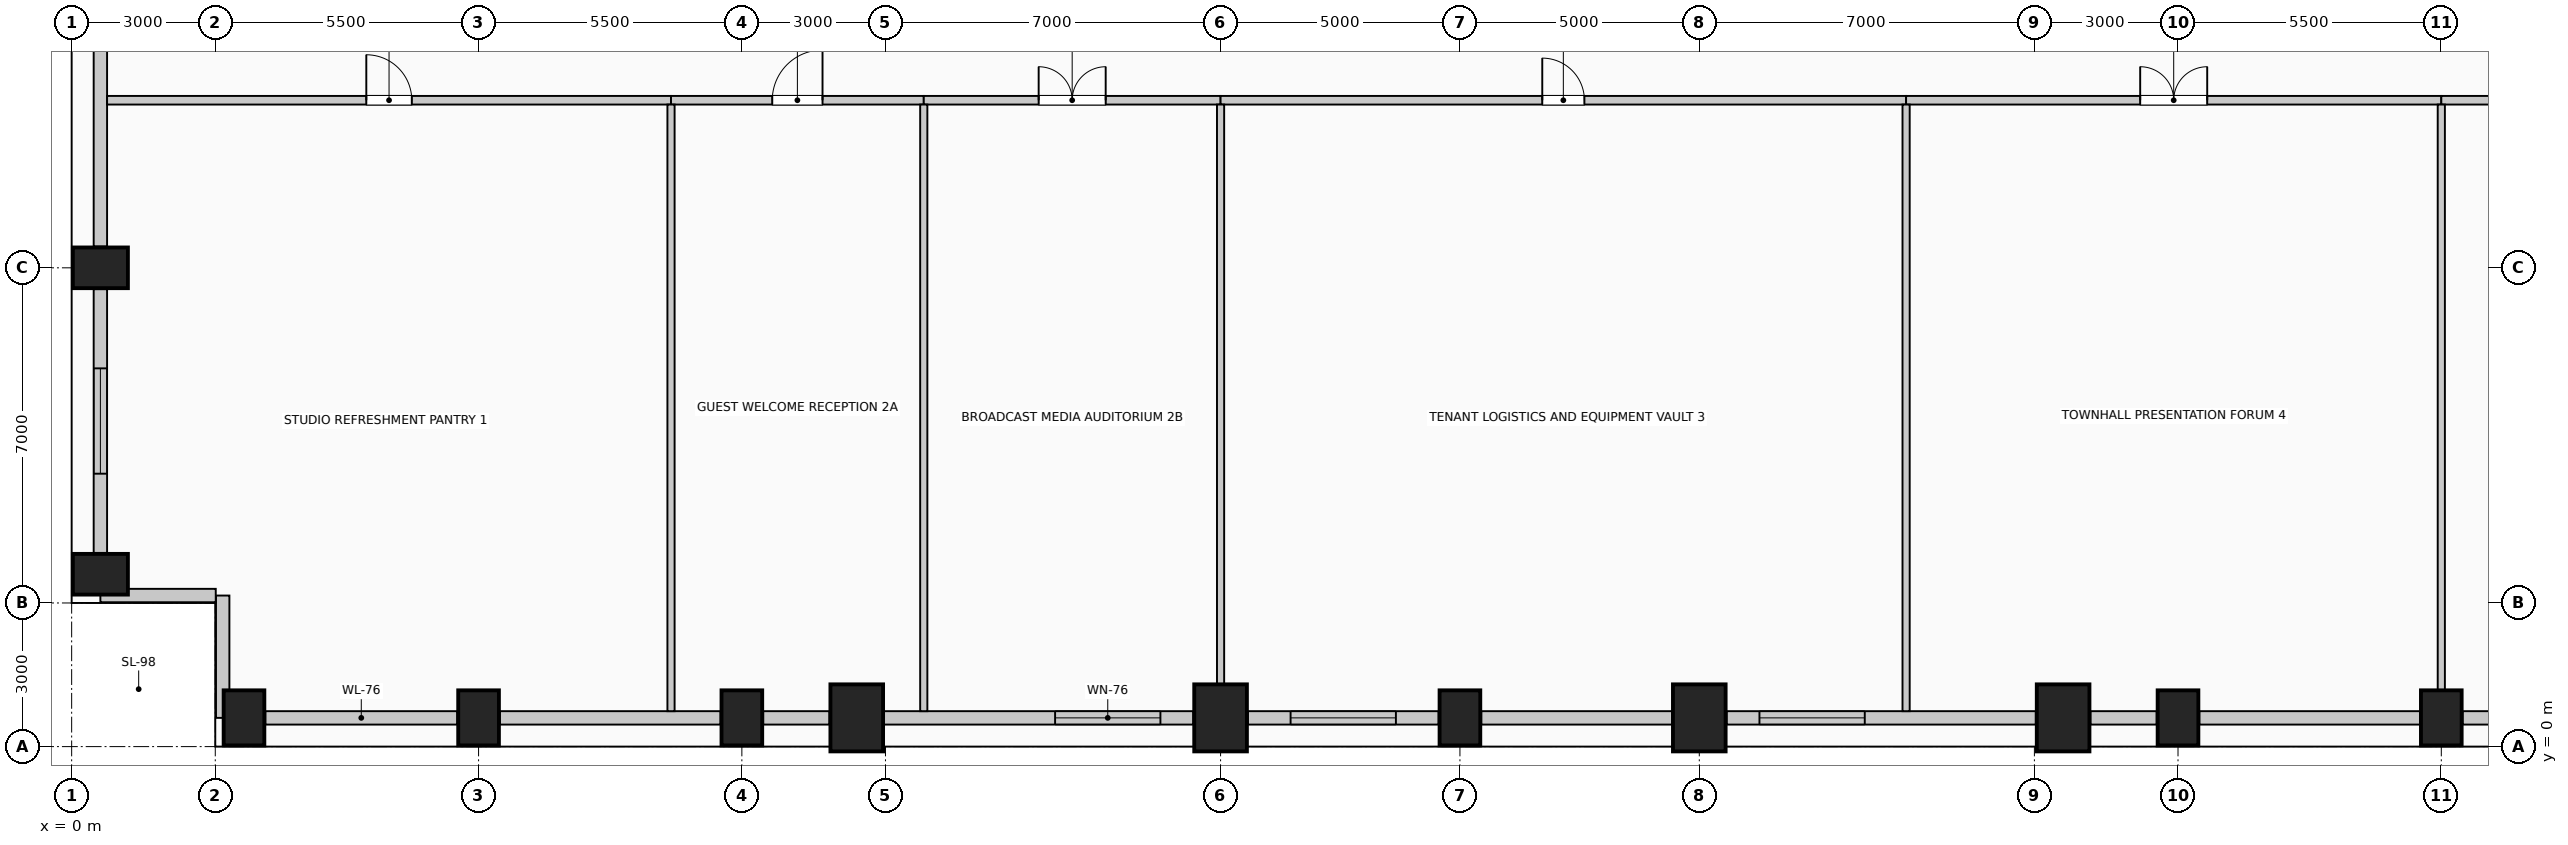
"""IFC4 building model, lengths in metres.
Left out: names, types, materials, properties, quantities, classifications, styles, units other than length and angle.
Written with IfcOpenShell. Run it as: python <this file> out.ifc"""

import sys

from ifc_helpers import new_model, si_unit, direction, frame, frame_2d, origin, origin_2d, place, context, subcontext, project, spatial, rectangle, extrude, element, fill, save


model = new_model("IFC4")
c1 = context("Model", 3, precision=1e-05, world=origin(), true_north=direction((0.0, 1.0)))
c2 = subcontext(c1, "Body", "Model", "MODEL_VIEW")
j1 = project(units=[si_unit("LENGTHUNIT", "METRE"), si_unit("PLANEANGLEUNIT", "RADIAN")], contexts=[c1])
p1 = place(None, origin())
s1 = spatial("IfcSite", under=j1, at=p1, CompositionType="ELEMENT")
p2 = place(p1, origin())
s2 = spatial("IfcBuilding", under=s1, at=p2, CompositionType="ELEMENT")
p3 = place(p2, frame((0.0, 0.0, 92.6)))
s3 = spatial("IfcBuildingStorey", under=s2, at=p3, CompositionType="ELEMENT", Elevation=92.6)
for number, where, z_axis, x_axis in (
    (1, (3.6, 0.6, 0.0), (0.0, 0.0, 1.0), (1.0, 0.0, 0.0)),
    (2, (8.5, 0.6, 0.0), (0.0, 0.0, 1.0), (1.0, 0.0, 0.0)),
    (3, (14.0, 0.6, 0.0), (0.0, 0.0, 1.0), (1.0, 0.0, 0.0)),
):
    element("IfcColumn", number, at=place(p3, frame(where, z_axis=z_axis, x_axis=x_axis)), inside=s3, PredefinedType="COLUMN", context=c2, shape_type="SweptSolid", body=[
        extrude(rectangle(XDim=0.85, YDim=1.15, at=origin_2d()), origin(), (0.0, 0.0, 1.0), 4.0),
    ])
for number, where, z_axis, x_axis in (
    (4, (16.4, 0.6, 0.0), (0.0, 0.0, 1.0), (1.0, 0.0, 0.0)),
    (5, (24.0, 0.6, 0.0), (0.0, 0.0, 1.0), (1.0, 0.0, 0.0)),
):
    element("IfcColumn", number, at=place(p3, frame(where, z_axis=z_axis, x_axis=x_axis)), inside=s3, PredefinedType="COLUMN", context=c2, shape_type="SweptSolid", body=[
        extrude(rectangle(XDim=1.1, YDim=1.4, at=origin_2d()), origin(), (0.0, 0.0, 1.0), 4.0),
    ])
p4 = place(p3, frame((29.0, 0.6, 0.0), z_axis=(0.0, 0.0, 1.0), x_axis=(1.0, 0.0, 0.0)))
e6 = element("IfcColumn", 6, at=p4, inside=s3, PredefinedType="COLUMN", context=c2, shape_type="SweptSolid", body=[
    extrude(rectangle(XDim=0.85, YDim=1.15, at=origin_2d()), origin(), (0.0, 0.0, 1.0), 4.0),
])
for number, where, z_axis, x_axis in (
    (7, (34.0, 0.6, 0.0), (0.0, 0.0, 1.0), (1.0, 0.0, 0.0)),
    (8, (41.6, 0.6, 0.0), (0.0, 0.0, 1.0), (1.0, 0.0, 0.0)),
):
    element("IfcColumn", number, at=place(p3, frame(where, z_axis=z_axis, x_axis=x_axis)), inside=s3, PredefinedType="COLUMN", context=c2, shape_type="SweptSolid", body=[
        extrude(rectangle(XDim=1.1, YDim=1.4, at=origin_2d()), origin(), (0.0, 0.0, 1.0), 4.0),
    ])
for number, where, z_axis, x_axis in (
    (9, (44.0, 0.6, 0.0), (0.0, 0.0, 1.0), (1.0, 0.0, 0.0)),
    (10, (49.5, 0.6, 0.0), (0.0, 0.0, 1.0), (1.0, 0.0, 0.0)),
    (11, (0.6, 3.6, 0.0), (0.0, 0.0, 1.0), (0.0, 1.0, 0.0)),
    (12, (0.6, 10.0, 0.0), (0.0, 0.0, 1.0), (0.0, 1.0, 0.0)),
):
    element("IfcColumn", number, at=place(p3, frame(where, z_axis=z_axis, x_axis=x_axis)), inside=s3, PredefinedType="COLUMN", context=c2, shape_type="SweptSolid", body=[
        extrude(rectangle(XDim=0.85, YDim=1.15, at=origin_2d()), origin(), (0.0, 0.0, 1.0), 4.0),
    ])
p5 = place(p3, frame((8.055, 0.6, 0.0), z_axis=(0.0, 0.0, 1.0), x_axis=(-1.0, 0.0, 0.0)))
e13 = element("IfcWall", 13, at=p5, inside=s3, PredefinedType="SOLIDWALL", context=c2, shape_type="SweptSolid", body=[
    extrude(rectangle(XDim=4.01, YDim=0.28, at=frame_2d((2.005, 0.0))), origin(), (0.0, 0.0, 1.0), 2.875),
])
p6 = place(p3, frame((13.555, 0.6, 0.0), z_axis=(0.0, 0.0, 1.0), x_axis=(-1.0, 0.0, 0.0)))
e14 = element("IfcWall", 14, at=p6, inside=s3, PredefinedType="SOLIDWALL", context=c2, shape_type="SweptSolid", body=[
    extrude(rectangle(XDim=4.61, YDim=0.28, at=frame_2d((2.305, 0.0))), origin(), (0.0, 0.0, 1.0), 2.875),
])
p7 = place(p3, frame((15.83, 0.6, 0.0), z_axis=(0.0, 0.0, 1.0), x_axis=(-1.0, 0.0, 0.0)))
e15 = element("IfcWall", 15, at=p7, inside=s3, PredefinedType="SOLIDWALL", context=c2, shape_type="SweptSolid", body=[
    extrude(rectangle(XDim=1.385, YDim=0.28, at=frame_2d((0.692, 0.0))), origin(), (0.0, 0.0, 1.0), 2.875),
])
p8 = place(p3, frame((23.43, 0.6, 0.0), z_axis=(0.0, 0.0, 1.0), x_axis=(-1.0, 0.0, 0.0)))
e16 = element("IfcWall", 16, at=p8, inside=s3, PredefinedType="SOLIDWALL", context=c2, shape_type="SweptSolid", body=[
    extrude(rectangle(XDim=6.46, YDim=0.28, at=frame_2d((3.23, 0.0))), origin(), (0.0, 0.0, 1.0), 2.875),
])
p9 = place(p8, frame((0.687, 0.0, 0.5)))
e17 = element("IfcOpeningElement", 17, at=p9, cuts=e16, PredefinedType="OPENING", context=c2, shape_type="SweptSolid", body=[
    extrude(rectangle(XDim=2.2, YDim=1.95, at=frame_2d((1.1, 0.975))), frame((0.0, 0.15, 0.0), z_axis=(0.0, -1.0, 0.0), x_axis=(1.0, 0.0, 0.0)), (0.0, 0.0, 1.0), 0.3),
])
p10 = place(p3, frame((28.555, 0.6, 0.0), z_axis=(0.0, 0.0, 1.0), x_axis=(-1.0, 0.0, 0.0)))
e18 = element("IfcWall", 18, at=p10, inside=s3, PredefinedType="SOLIDWALL", context=c2, shape_type="SweptSolid", body=[
    extrude(rectangle(XDim=3.985, YDim=0.28, at=frame_2d((1.992, 0.0))), origin(), (0.0, 0.0, 1.0), 2.875),
])
p11 = place(p10, frame((0.893, 0.0, 0.5)))
e19 = element("IfcOpeningElement", 19, at=p11, cuts=e18, PredefinedType="OPENING", context=c2, shape_type="SweptSolid", body=[
    extrude(rectangle(XDim=2.2, YDim=1.95, at=frame_2d((1.1, 0.975))), frame((0.0, 0.15, 0.0), z_axis=(0.0, -1.0, 0.0), x_axis=(1.0, 0.0, 0.0)), (0.0, 0.0, 1.0), 0.3),
])
p12 = place(p3, frame((33.43, 0.6, 0.0), z_axis=(0.0, 0.0, 1.0), x_axis=(-1.0, 0.0, 0.0)))
e20 = element("IfcWall", 20, at=p12, inside=s3, PredefinedType="SOLIDWALL", context=c2, shape_type="SweptSolid", body=[
    extrude(rectangle(XDim=3.985, YDim=0.28, at=frame_2d((1.992, 0.0))), origin(), (0.0, 0.0, 1.0), 2.875),
])
p13 = place(p3, frame((41.03, 0.6, 0.0), z_axis=(0.0, 0.0, 1.0), x_axis=(-1.0, 0.0, 0.0)))
e21 = element("IfcWall", 21, at=p13, inside=s3, PredefinedType="SOLIDWALL", context=c2, shape_type="SweptSolid", body=[
    extrude(rectangle(XDim=6.46, YDim=0.28, at=frame_2d((3.23, 0.0))), origin(), (0.0, 0.0, 1.0), 2.875),
])
p14 = place(p13, frame((3.573, 0.0, 0.5)))
e22 = element("IfcOpeningElement", 22, at=p14, cuts=e21, PredefinedType="OPENING", context=c2, shape_type="SweptSolid", body=[
    extrude(rectangle(XDim=2.2, YDim=1.95, at=frame_2d((1.1, 0.975))), frame((0.0, 0.15, 0.0), z_axis=(0.0, -1.0, 0.0), x_axis=(1.0, 0.0, 0.0)), (0.0, 0.0, 1.0), 0.3),
])
p15 = place(p3, frame((43.555, 0.6, 0.0), z_axis=(0.0, 0.0, 1.0), x_axis=(-1.0, 0.0, 0.0)))
e23 = element("IfcWall", 23, at=p15, inside=s3, PredefinedType="SOLIDWALL", context=c2, shape_type="SweptSolid", body=[
    extrude(rectangle(XDim=1.385, YDim=0.28, at=frame_2d((0.692, 0.0))), origin(), (0.0, 0.0, 1.0), 2.875),
])
p16 = place(p3, frame((49.055, 0.6, 0.0), z_axis=(0.0, 0.0, 1.0), x_axis=(-1.0, 0.0, 0.0)))
e24 = element("IfcWall", 24, at=p16, inside=s3, PredefinedType="SOLIDWALL", context=c2, shape_type="SweptSolid", body=[
    extrude(rectangle(XDim=4.61, YDim=0.28, at=frame_2d((2.305, 0.0))), origin(), (0.0, 0.0, 1.0), 2.875),
])
p17 = place(p3, frame((53.955, 0.6, 0.0), z_axis=(0.0, 0.0, 1.0), x_axis=(-1.0, 0.0, 0.0)))
e25 = element("IfcWall", 25, at=p17, inside=s3, PredefinedType="SOLIDWALL", context=c2, shape_type="SweptSolid", body=[
    extrude(rectangle(XDim=4.01, YDim=0.28, at=frame_2d((2.005, 0.0))), origin(), (0.0, 0.0, 1.0), 2.875),
])
p18 = place(p3, frame((0.6, 4.045, 0.0), z_axis=(0.0, 0.0, 1.0), x_axis=(0.0, 1.0, 0.0)))
e26 = element("IfcWall", 26, at=p18, inside=s3, PredefinedType="SOLIDWALL", context=c2, shape_type="SweptSolid", body=[
    extrude(rectangle(XDim=5.51, YDim=0.28, at=frame_2d((2.755, 0.0))), origin(), (0.0, 0.0, 1.0), 2.875),
])
p19 = place(p18, frame((1.655, 0.0, 0.5)))
e27 = element("IfcOpeningElement", 27, at=p19, cuts=e26, PredefinedType="OPENING", context=c2, shape_type="SweptSolid", body=[
    extrude(rectangle(XDim=2.2, YDim=1.95, at=frame_2d((1.1, 0.975))), frame((0.0, 0.15, 0.0), z_axis=(0.0, -1.0, 0.0), x_axis=(1.0, 0.0, 0.0)), (0.0, 0.0, 1.0), 0.3),
])
p20 = place(p3, frame((0.6, 10.445, 0.0), z_axis=(0.0, 0.0, 1.0), x_axis=(0.0, 1.0, 0.0)))
e28 = element("IfcWall", 28, at=p20, inside=s3, PredefinedType="SOLIDWALL", context=c2, shape_type="SweptSolid", body=[
    extrude(rectangle(XDim=7.11, YDim=0.28, at=frame_2d((3.555, 0.0))), origin(), (0.0, 0.0, 1.0), 2.875),
])
p21 = place(p3, frame((3.155, 0.6, 0.0), z_axis=(0.0, 0.0, 1.0), x_axis=(0.0, 1.0, 0.0)))
e29 = element("IfcWall", 29, at=p21, inside=s3, PredefinedType="SOLIDWALL", context=c2, shape_type="SweptSolid", body=[
    extrude(rectangle(XDim=2.555, YDim=0.28, at=frame_2d((1.277, 0.0))), origin(), (0.0, 0.0, 1.0), 3.725),
])
p22 = place(p3, frame((3.01, 3.155, 0.0), z_axis=(0.0, 0.0, 1.0), x_axis=(-1.0, 0.0, 0.0)))
e30 = element("IfcWall", 30, at=p22, inside=s3, PredefinedType="SOLIDWALL", context=c2, shape_type="SweptSolid", body=[
    extrude(rectangle(XDim=2.41, YDim=0.28, at=frame_2d((1.205, 0.0))), origin(), (0.0, 0.0, 1.0), 3.725),
])
p23 = place(p3, frame((0.74, 13.5, 0.0), z_axis=(0.0, 0.0, 1.0), x_axis=(1.0, 0.0, 0.0)))
e31 = element("IfcWall", 31, at=p23, inside=s3, PredefinedType="PARTITIONING", context=c2, shape_type="SweptSolid", body=[
    extrude(rectangle(XDim=11.78, YDim=0.18, at=frame_2d((5.89, 0.0))), origin(), (0.0, 0.0, 1.0), 3.725),
])
p24 = place(p23, frame((5.415, 0.0, 0.0)))
e32 = element("IfcOpeningElement", 32, at=p24, cuts=e31, PredefinedType="OPENING", context=c2, shape_type="SweptSolid", body=[
    extrude(rectangle(XDim=0.95, YDim=2.15, at=frame_2d((0.475, 1.075))), frame((0.0, 0.1, 0.0), z_axis=(0.0, -1.0, 0.0), x_axis=(1.0, 0.0, 0.0)), (0.0, 0.0, 1.0), 0.2),
])
p25 = place(p3, frame((12.52, 13.5, 0.0), z_axis=(0.0, 0.0, 1.0), x_axis=(1.0, 0.0, 0.0)))
e33 = element("IfcWall", 33, at=p25, inside=s3, PredefinedType="PARTITIONING", context=c2, shape_type="SweptSolid", body=[
    extrude(rectangle(XDim=5.28, YDim=0.18, at=frame_2d((2.64, 0.0))), origin(), (0.0, 0.0, 1.0), 3.725),
])
p26 = place(p25, frame((2.115, 0.0, 0.0)))
e34 = element("IfcOpeningElement", 34, at=p26, cuts=e33, PredefinedType="OPENING", context=c2, shape_type="SweptSolid", body=[
    extrude(rectangle(XDim=1.05, YDim=2.15, at=frame_2d((0.525, 1.075))), frame((0.0, 0.1, 0.0), z_axis=(0.0, -1.0, 0.0), x_axis=(1.0, 0.0, 0.0)), (0.0, 0.0, 1.0), 0.2),
])
p27 = place(p3, frame((17.8, 13.5, 0.0), z_axis=(0.0, 0.0, 1.0), x_axis=(1.0, 0.0, 0.0)))
e35 = element("IfcWall", 35, at=p27, inside=s3, PredefinedType="PARTITIONING", context=c2, shape_type="SweptSolid", body=[
    extrude(rectangle(XDim=6.2, YDim=0.18, at=frame_2d((3.1, 0.0))), origin(), (0.0, 0.0, 1.0), 3.725),
])
p28 = place(p27, frame((2.4, 0.0, 0.0)))
e36 = element("IfcOpeningElement", 36, at=p28, cuts=e35, PredefinedType="OPENING", context=c2, shape_type="SweptSolid", body=[
    extrude(rectangle(XDim=1.4, YDim=2.2, at=frame_2d((0.7, 1.1))), frame((0.0, 0.1, 0.0), z_axis=(0.0, -1.0, 0.0), x_axis=(1.0, 0.0, 0.0)), (0.0, 0.0, 1.0), 0.2),
])
p29 = place(p3, frame((24.0, 13.5, 0.0), z_axis=(0.0, 0.0, 1.0), x_axis=(1.0, 0.0, 0.0)))
e37 = element("IfcWall", 37, at=p29, inside=s3, PredefinedType="PARTITIONING", context=c2, shape_type="SweptSolid", body=[
    extrude(rectangle(XDim=14.32, YDim=0.18, at=frame_2d((7.16, 0.0))), origin(), (0.0, 0.0, 1.0), 3.725),
])
p30 = place(p29, frame((6.72, 0.0, 0.0)))
e38 = element("IfcOpeningElement", 38, at=p30, cuts=e37, PredefinedType="OPENING", context=c2, shape_type="SweptSolid", body=[
    extrude(rectangle(XDim=0.88, YDim=2.1, at=frame_2d((0.44, 1.05))), frame((0.0, 0.1, 0.0), z_axis=(0.0, -1.0, 0.0), x_axis=(1.0, 0.0, 0.0)), (0.0, 0.0, 1.0), 0.2),
])
p31 = place(p3, frame((38.32, 13.5, 0.0), z_axis=(0.0, 0.0, 1.0), x_axis=(1.0, 0.0, 0.0)))
e39 = element("IfcWall", 39, at=p31, inside=s3, PredefinedType="PARTITIONING", context=c2, shape_type="SweptSolid", body=[
    extrude(rectangle(XDim=11.18, YDim=0.18, at=frame_2d((5.59, 0.0))), origin(), (0.0, 0.0, 1.0), 3.725),
])
p32 = place(p31, frame((4.89, 0.0, 0.0)))
e40 = element("IfcOpeningElement", 40, at=p32, cuts=e39, PredefinedType="OPENING", context=c2, shape_type="SweptSolid", body=[
    extrude(rectangle(XDim=1.4, YDim=2.2, at=frame_2d((0.7, 1.1))), frame((0.0, 0.1, 0.0), z_axis=(0.0, -1.0, 0.0), x_axis=(1.0, 0.0, 0.0)), (0.0, 0.0, 1.0), 0.2),
])
p33 = place(p3, frame((49.5, 13.5, 0.0), z_axis=(0.0, 0.0, 1.0), x_axis=(1.0, 0.0, 0.0)))
e41 = element("IfcWall", 41, at=p33, inside=s3, PredefinedType="PARTITIONING", context=c2, shape_type="SweptSolid", body=[
    extrude(rectangle(XDim=7.76, YDim=0.18, at=frame_2d((3.88, 0.0))), origin(), (0.0, 0.0, 1.0), 3.725),
])
p34 = place(p33, frame((3.18, 0.0, 0.0)))
e42 = element("IfcOpeningElement", 42, at=p34, cuts=e41, PredefinedType="OPENING", context=c2, shape_type="SweptSolid", body=[
    extrude(rectangle(XDim=1.4, YDim=2.2, at=frame_2d((0.7, 1.1))), frame((0.0, 0.1, 0.0), z_axis=(0.0, -1.0, 0.0), x_axis=(1.0, 0.0, 0.0)), (0.0, 0.0, 1.0), 0.2),
])
for number, where, z_axis, x_axis in (
    (43, (12.52, 0.74, 0.0), (0.0, 0.0, 1.0), (0.0, 1.0, 0.0)),
    (44, (17.8, 0.74, 0.0), (0.0, 0.0, 1.0), (0.0, 1.0, 0.0)),
):
    element("IfcWall", number, at=place(p3, frame(where, z_axis=z_axis, x_axis=x_axis)), inside=s3, PredefinedType="PARTITIONING", context=c2, shape_type="SweptSolid", body=[
        extrude(rectangle(XDim=12.67, YDim=0.15, at=frame_2d((6.335, 0.0))), origin(), (0.0, 0.0, 1.0), 3.725),
    ])
p35 = place(p3, frame((24.0, 1.3, 0.0), z_axis=(0.0, 0.0, 1.0), x_axis=(0.0, 1.0, 0.0)))
e45 = element("IfcWall", 45, at=p35, inside=s3, PredefinedType="PARTITIONING", context=c2, shape_type="SweptSolid", body=[
    extrude(rectangle(XDim=12.11, YDim=0.15, at=frame_2d((6.055, 0.0))), origin(), (0.0, 0.0, 1.0), 3.725),
])
p36 = place(p3, frame((38.32, 0.74, 0.0), z_axis=(0.0, 0.0, 1.0), x_axis=(0.0, 1.0, 0.0)))
e46 = element("IfcWall", 46, at=p36, inside=s3, PredefinedType="PARTITIONING", context=c2, shape_type="SweptSolid", body=[
    extrude(rectangle(XDim=12.67, YDim=0.15, at=frame_2d((6.335, 0.0))), origin(), (0.0, 0.0, 1.0), 3.725),
])
p37 = place(p3, frame((49.5, 1.175, 0.0), z_axis=(0.0, 0.0, 1.0), x_axis=(0.0, 1.0, 0.0)))
e47 = element("IfcWall", 47, at=p37, inside=s3, PredefinedType="PARTITIONING", context=c2, shape_type="SweptSolid", body=[
    extrude(rectangle(XDim=12.235, YDim=0.15, at=frame_2d((6.117, 0.0))), origin(), (0.0, 0.0, 1.0), 3.725),
])
p38 = place(p9, origin())
e48 = element("IfcWindow", 48, at=p38, inside=s3, PartitioningType="SINGLE_PANEL", PredefinedType="WINDOW", context=c2, shape_type="SweptSolid", body=[
    extrude(rectangle(XDim=2.2, YDim=1.95, at=frame_2d((1.1, 0.975))), frame((0.0, 0.03, 0.0), z_axis=(0.0, -1.0, 0.0), x_axis=(1.0, 0.0, 0.0)), (0.0, 0.0, 1.0), 0.06),
])
fill(e17, e48)
p39 = place(p11, origin())
e49 = element("IfcWindow", 49, at=p39, inside=s3, PartitioningType="SINGLE_PANEL", PredefinedType="WINDOW", context=c2, shape_type="SweptSolid", body=[
    extrude(rectangle(XDim=2.2, YDim=1.95, at=frame_2d((1.1, 0.975))), frame((0.0, 0.03, 0.0), z_axis=(0.0, -1.0, 0.0), x_axis=(1.0, 0.0, 0.0)), (0.0, 0.0, 1.0), 0.06),
])
fill(e19, e49)
p40 = place(p14, origin())
e50 = element("IfcWindow", 50, at=p40, inside=s3, PartitioningType="SINGLE_PANEL", PredefinedType="WINDOW", context=c2, shape_type="SweptSolid", body=[
    extrude(rectangle(XDim=2.2, YDim=1.95, at=frame_2d((1.1, 0.975))), frame((0.0, 0.03, 0.0), z_axis=(0.0, -1.0, 0.0), x_axis=(1.0, 0.0, 0.0)), (0.0, 0.0, 1.0), 0.06),
])
fill(e22, e50)
p41 = place(p19, origin())
e51 = element("IfcWindow", 51, at=p41, inside=s3, PartitioningType="SINGLE_PANEL", PredefinedType="WINDOW", context=c2, shape_type="SweptSolid", body=[
    extrude(rectangle(XDim=2.2, YDim=1.95, at=frame_2d((1.1, 0.975))), frame((0.0, 0.03, 0.0), z_axis=(0.0, -1.0, 0.0), x_axis=(1.0, 0.0, 0.0)), (0.0, 0.0, 1.0), 0.06),
])
fill(e27, e51)
p42 = place(p24, origin())
e52 = element("IfcDoor", 52, at=p42, inside=s3, OperationType="SINGLE_SWING_LEFT", PredefinedType="DOOR", context=c2, shape_type="SweptSolid", body=[
    extrude(rectangle(XDim=0.95, YDim=2.15, at=frame_2d((0.475, 1.075))), frame((0.0, 0.025, 0.0), z_axis=(0.0, -1.0, 0.0), x_axis=(1.0, 0.0, 0.0)), (0.0, 0.0, 1.0), 0.05),
])
fill(e32, e52)
p43 = place(p26, origin())
e53 = element("IfcDoor", 53, at=p43, inside=s3, OperationType="SINGLE_SWING_RIGHT", PredefinedType="DOOR", context=c2, shape_type="SweptSolid", body=[
    extrude(rectangle(XDim=1.05, YDim=2.15, at=frame_2d((0.525, 1.075))), frame((0.0, 0.025, 0.0), z_axis=(0.0, -1.0, 0.0), x_axis=(1.0, 0.0, 0.0)), (0.0, 0.0, 1.0), 0.05),
])
fill(e34, e53)
p44 = place(p28, origin())
e54 = element("IfcDoor", 54, at=p44, inside=s3, OperationType="DOUBLE_DOOR_SINGLE_SWING", PredefinedType="DOOR", context=c2, shape_type="SweptSolid", body=[
    extrude(rectangle(XDim=1.4, YDim=2.2, at=frame_2d((0.7, 1.1))), frame((0.0, 0.025, 0.0), z_axis=(0.0, -1.0, 0.0), x_axis=(1.0, 0.0, 0.0)), (0.0, 0.0, 1.0), 0.05),
])
fill(e36, e54)
p45 = place(p30, origin())
e55 = element("IfcDoor", 55, at=p45, inside=s3, OperationType="SINGLE_SWING_LEFT", PredefinedType="DOOR", context=c2, shape_type="SweptSolid", body=[
    extrude(rectangle(XDim=0.88, YDim=2.1, at=frame_2d((0.44, 1.05))), frame((0.0, 0.025, 0.0), z_axis=(0.0, -1.0, 0.0), x_axis=(1.0, 0.0, 0.0)), (0.0, 0.0, 1.0), 0.05),
])
fill(e38, e55)
p46 = place(p32, origin())
e56 = element("IfcDoor", 56, at=p46, inside=s3, OperationType="DOUBLE_DOOR_SINGLE_SWING", PredefinedType="DOOR", context=c2, shape_type="SweptSolid", body=[
    extrude(rectangle(XDim=1.4, YDim=2.2, at=frame_2d((0.7, 1.1))), frame((0.0, 0.025, 0.0), z_axis=(0.0, -1.0, 0.0), x_axis=(1.0, 0.0, 0.0)), (0.0, 0.0, 1.0), 0.05),
])
fill(e40, e56)
save(model, sys.argv[1])
